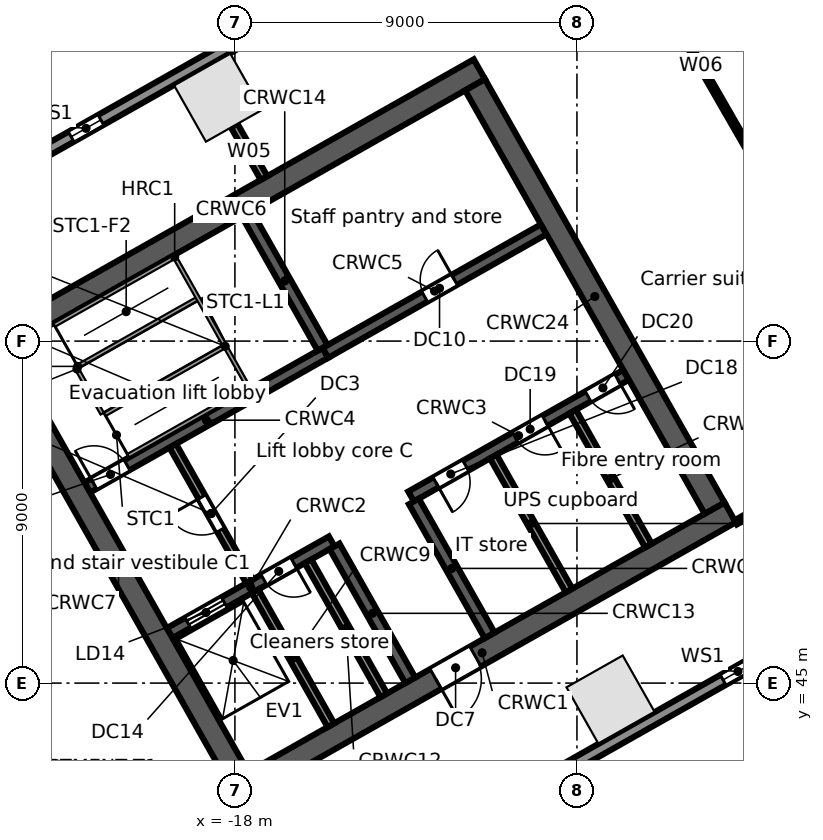
"""IFC4 building model, lengths in metres.
Left out: names, types, materials, properties, quantities, classifications, styles, units other than length and angle.
Written with IfcOpenShell. Run it as: python <this file> out.ifc"""

import sys

from ifc_helpers import new_model, si_unit, direction, frame, frame_2d, origin, origin_2d, place, context, subcontext, project, spatial, rectangle, extrude, element, fill, save


model = new_model("IFC4")
c1 = context("Model", 3, precision=1e-05, world=origin(), true_north=direction((0.0, 1.0)))
c2 = subcontext(c1, "Body", "Model", "MODEL_VIEW")
j1 = project(units=[si_unit("LENGTHUNIT", "METRE"), si_unit("PLANEANGLEUNIT", "RADIAN")], contexts=[c1])
p1 = place(None, origin())
s1 = spatial("IfcSite", under=j1, at=p1, CompositionType="ELEMENT")
p2 = place(p1, origin())
s2 = spatial("IfcBuilding", under=s1, at=p2, CompositionType="ELEMENT")
p3 = place(p2, frame((0.0, 0.0, 86.5)))
s3 = spatial("IfcBuildingStorey", under=s2, at=p3, CompositionType="ELEMENT", Elevation=86.5)
for number, where, z_axis, x_axis in (
    (1, (-18.441, 60.406, 0.0), (0.0, 0.0, 1.0), (-0.87, -0.492, 0.0)),
    (2, (-8.117, 44.568, 0.0), (0.0, 0.0, 1.0), (0.87, 0.492, 0.0)),
):
    element("IfcColumn", number, at=place(p3, frame(where, z_axis=z_axis, x_axis=x_axis)), inside=s3, PredefinedType="COLUMN", context=c2, shape_type="SweptSolid", body=[
        extrude(rectangle(XDim=1.7, YDim=1.7, at=origin_2d()), origin(), (0.0, 0.0, 1.0), 5.0),
    ])
p4 = place(p3, frame((-58.745, 38.764, 0.0), z_axis=(0.0, 0.0, 1.0), x_axis=(0.870355811726, 0.492423355453, 0.0)))
e3 = element("IfcWall", 3, at=p4, inside=s3, PredefinedType="STANDARD", context=c2, shape_type="SweptSolid", body=[
    extrude(rectangle(XDim=64.025, YDim=0.3, at=frame_2d((32.013, 0.0))), origin(), (0.0, 0.0, 1.0), 4.65),
])
p5 = place(p4, frame((60.122, 0.0, 0.6)))
e4 = element("IfcOpeningElement", 4, at=p5, cuts=e3, PredefinedType="OPENING", context=c2, shape_type="SweptSolid", body=[
    extrude(rectangle(XDim=0.9, YDim=3.2, at=frame_2d((0.45, 1.6))), frame((0.0, 0.16, 0.0), z_axis=(0.0, -1.0, 0.0), x_axis=(1.0, 0.0, 0.0)), (0.0, 0.0, 1.0), 0.32),
])
p6 = place(p4, frame((50.992, 0.0, 0.6)))
e5 = element("IfcOpeningElement", 5, at=p6, cuts=e3, PredefinedType="OPENING", context=c2, shape_type="SweptSolid", body=[
    extrude(rectangle(XDim=0.9, YDim=3.2, at=frame_2d((0.45, 1.6))), frame((0.0, 0.16, 0.0), z_axis=(0.0, -1.0, 0.0), x_axis=(1.0, 0.0, 0.0)), (0.0, 0.0, 1.0), 0.32),
])
p7 = place(p4, frame((41.862, 0.0, 0.6)))
e6 = element("IfcOpeningElement", 6, at=p7, cuts=e3, PredefinedType="OPENING", context=c2, shape_type="SweptSolid", body=[
    extrude(rectangle(XDim=0.9, YDim=3.2, at=frame_2d((0.45, 1.6))), frame((0.0, 0.16, 0.0), z_axis=(0.0, -1.0, 0.0), x_axis=(1.0, 0.0, 0.0)), (0.0, 0.0, 1.0), 0.32),
])
p8 = place(p4, frame((32.732, 0.0, 0.6)))
e7 = element("IfcOpeningElement", 7, at=p8, cuts=e3, PredefinedType="OPENING", context=c2, shape_type="SweptSolid", body=[
    extrude(rectangle(XDim=0.9, YDim=3.2, at=frame_2d((0.45, 1.6))), frame((0.0, 0.16, 0.0), z_axis=(0.0, -1.0, 0.0), x_axis=(1.0, 0.0, 0.0)), (0.0, 0.0, 1.0), 0.32),
])
p9 = place(p4, frame((23.602, 0.0, 0.6)))
e8 = element("IfcOpeningElement", 8, at=p9, cuts=e3, PredefinedType="OPENING", context=c2, shape_type="SweptSolid", body=[
    extrude(rectangle(XDim=0.9, YDim=3.2, at=frame_2d((0.45, 1.6))), frame((0.0, 0.16, 0.0), z_axis=(0.0, -1.0, 0.0), x_axis=(1.0, 0.0, 0.0)), (0.0, 0.0, 1.0), 0.32),
])
p10 = place(p4, frame((14.472, 0.0, 0.6)))
e9 = element("IfcOpeningElement", 9, at=p10, cuts=e3, PredefinedType="OPENING", context=c2, shape_type="SweptSolid", body=[
    extrude(rectangle(XDim=0.9, YDim=3.2, at=frame_2d((0.45, 1.6))), frame((0.0, 0.16, 0.0), z_axis=(0.0, -1.0, 0.0), x_axis=(1.0, 0.0, 0.0)), (0.0, 0.0, 1.0), 0.32),
])
p11 = place(p4, frame((5.342, 0.0, 0.6)))
e10 = element("IfcOpeningElement", 10, at=p11, cuts=e3, PredefinedType="OPENING", context=c2, shape_type="SweptSolid", body=[
    extrude(rectangle(XDim=0.9, YDim=3.2, at=frame_2d((0.45, 1.6))), frame((0.0, 0.16, 0.0), z_axis=(0.0, -1.0, 0.0), x_axis=(1.0, 0.0, 0.0)), (0.0, 0.0, 1.0), 0.32),
])
p12 = place(p3, frame((-0.055, 47.969, 0.0), z_axis=(0.0, 0.0, 1.0), x_axis=(-0.870355730478, -0.492423499058, 0.0)))
e11 = element("IfcWall", 11, at=p12, inside=s3, PredefinedType="STANDARD", context=c2, shape_type="SweptSolid", body=[
    extrude(rectangle(XDim=43.75, YDim=0.3, at=frame_2d((21.875, 0.0))), origin(), (0.0, 0.0, 1.0), 4.65),
])
p13 = place(p12, frame((39.977, 0.0, 0.6)))
e12 = element("IfcOpeningElement", 12, at=p13, cuts=e11, PredefinedType="OPENING", context=c2, shape_type="SweptSolid", body=[
    extrude(rectangle(XDim=0.9, YDim=3.2, at=frame_2d((0.45, 1.6))), frame((0.0, 0.16, 0.0), z_axis=(0.0, -1.0, 0.0), x_axis=(1.0, 0.0, 0.0)), (0.0, 0.0, 1.0), 0.32),
])
p14 = place(p12, frame((31.222, 0.0, 0.6)))
e13 = element("IfcOpeningElement", 13, at=p14, cuts=e11, PredefinedType="OPENING", context=c2, shape_type="SweptSolid", body=[
    extrude(rectangle(XDim=0.9, YDim=3.2, at=frame_2d((0.45, 1.6))), frame((0.0, 0.16, 0.0), z_axis=(0.0, -1.0, 0.0), x_axis=(1.0, 0.0, 0.0)), (0.0, 0.0, 1.0), 0.32),
])
p15 = place(p12, frame((22.468, 0.0, 0.6)))
e14 = element("IfcOpeningElement", 14, at=p15, cuts=e11, PredefinedType="OPENING", context=c2, shape_type="SweptSolid", body=[
    extrude(rectangle(XDim=0.9, YDim=3.2, at=frame_2d((0.45, 1.6))), frame((0.0, 0.16, 0.0), z_axis=(0.0, -1.0, 0.0), x_axis=(1.0, 0.0, 0.0)), (0.0, 0.0, 1.0), 0.32),
])
p16 = place(p12, frame((13.713, 0.0, 0.6)))
e15 = element("IfcOpeningElement", 15, at=p16, cuts=e11, PredefinedType="OPENING", context=c2, shape_type="SweptSolid", body=[
    extrude(rectangle(XDim=0.9, YDim=3.2, at=frame_2d((0.45, 1.6))), frame((0.0, 0.16, 0.0), z_axis=(0.0, -1.0, 0.0), x_axis=(1.0, 0.0, 0.0)), (0.0, 0.0, 1.0), 0.32),
])
p17 = place(p12, frame((4.959, 0.0, 0.6)))
e16 = element("IfcOpeningElement", 16, at=p17, cuts=e11, PredefinedType="OPENING", context=c2, shape_type="SweptSolid", body=[
    extrude(rectangle(XDim=0.9, YDim=3.2, at=frame_2d((0.45, 1.6))), frame((0.0, 0.16, 0.0), z_axis=(0.0, -1.0, 0.0), x_axis=(1.0, 0.0, 0.0)), (0.0, 0.0, 1.0), 0.32),
])
p18 = place(p3, frame((-18.024, 42.104, 0.0), z_axis=(0.0, 0.0, 1.0), x_axis=(0.870360574057, 0.492414937962, 0.0)))
e17 = element("IfcWall", 17, at=p18, inside=s3, PredefinedType="SOLIDWALL", context=c2, shape_type="SweptSolid", body=[
    extrude(rectangle(XDim=15.0, YDim=0.6, at=frame_2d((7.5, 0.0))), origin(), (0.0, 0.0, 1.0), 4.65),
])
p19 = place(p18, frame((6.1, 0.0, 0.0)))
e18 = element("IfcOpeningElement", 18, at=p19, cuts=e17, PredefinedType="OPENING", context=c2, shape_type="SweptSolid", body=[
    extrude(rectangle(XDim=1.2, YDim=2.1, at=frame_2d((0.6, 1.05))), frame((0.0, 0.31, 0.0), z_axis=(0.0, -1.0, 0.0), x_axis=(1.0, 0.0, 0.0)), (0.0, 0.0, 1.0), 0.62),
])
p20 = place(p3, frame((-19.718, 46.316, 0.0), z_axis=(0.0, 0.0, 1.0), x_axis=(0.870353963862, 0.492426621528, 0.0)))
e19 = element("IfcWall", 19, at=p20, inside=s3, PredefinedType="SOLIDWALL", context=c2, shape_type="SweptSolid", body=[
    extrude(rectangle(XDim=4.9, YDim=0.3, at=frame_2d((2.45, 0.0))), origin(), (0.0, 0.0, 1.0), 4.65),
])
p21 = place(p20, frame((0.55, 0.0, 0.0)))
e20 = element("IfcOpeningElement", 20, at=p21, cuts=e19, PredefinedType="OPENING", context=c2, shape_type="SweptSolid", body=[
    extrude(rectangle(XDim=1.1, YDim=2.1, at=frame_2d((0.55, 1.05))), frame((0.0, 0.16, 0.0), z_axis=(0.0, -1.0, 0.0), x_axis=(1.0, 0.0, 0.0)), (0.0, 0.0, 1.0), 0.32),
])
p22 = place(p20, frame((2.85, 0.0, 0.0)))
e21 = element("IfcOpeningElement", 21, at=p22, cuts=e19, PredefinedType="OPENING", context=c2, shape_type="SweptSolid", body=[
    extrude(rectangle(XDim=0.9, YDim=2.1, at=frame_2d((0.45, 1.05))), frame((0.0, 0.16, 0.0), z_axis=(0.0, -1.0, 0.0), x_axis=(1.0, 0.0, 0.0)), (0.0, 0.0, 1.0), 0.32),
])
p23 = place(p3, frame((-13.365, 49.911, 0.0), z_axis=(0.0, 0.0, 1.0), x_axis=(0.870340995471, 0.49244954219, 0.0)))
e22 = element("IfcWall", 22, at=p23, inside=s3, PredefinedType="SOLIDWALL", context=c2, shape_type="SweptSolid", body=[
    extrude(rectangle(XDim=6.5, YDim=0.3, at=frame_2d((3.25, 0.0))), origin(), (0.0, 0.0, 1.0), 4.65),
])
p24 = place(p23, frame((0.75, 0.0, 0.0)))
e23 = element("IfcOpeningElement", 23, at=p24, cuts=e22, PredefinedType="OPENING", context=c2, shape_type="SweptSolid", body=[
    extrude(rectangle(XDim=0.9, YDim=2.1, at=frame_2d((0.45, 1.05))), frame((0.0, 0.16, 0.0), z_axis=(0.0, -1.0, 0.0), x_axis=(1.0, 0.0, 0.0)), (0.0, 0.0, 1.0), 0.32),
])
p25 = place(p23, frame((3.15, 0.0, 0.0)))
e24 = element("IfcOpeningElement", 24, at=p25, cuts=e22, PredefinedType="OPENING", context=c2, shape_type="SweptSolid", body=[
    extrude(rectangle(XDim=0.9, YDim=2.1, at=frame_2d((0.45, 1.05))), frame((0.0, 0.16, 0.0), z_axis=(0.0, -1.0, 0.0), x_axis=(1.0, 0.0, 0.0)), (0.0, 0.0, 1.0), 0.32),
])
p26 = place(p23, frame((5.35, 0.0, 0.0)))
e25 = element("IfcOpeningElement", 25, at=p26, cuts=e22, PredefinedType="OPENING", context=c2, shape_type="SweptSolid", body=[
    extrude(rectangle(XDim=0.9, YDim=2.1, at=frame_2d((0.45, 1.05))), frame((0.0, 0.16, 0.0), z_axis=(0.0, -1.0, 0.0), x_axis=(1.0, 0.0, 0.0)), (0.0, 0.0, 1.0), 0.32),
])
p27 = place(p3, frame((-21.885, 50.146, 0.0), z_axis=(0.0, 0.0, 1.0), x_axis=(0.870359411463, 0.492416992881, 0.0)))
e26 = element("IfcWall", 26, at=p27, inside=s3, PredefinedType="SOLIDWALL", context=c2, shape_type="SweptSolid", body=[
    extrude(rectangle(XDim=7.2, YDim=0.3, at=frame_2d((3.6, 0.0))), origin(), (0.0, 0.0, 1.0), 4.65),
])
p28 = place(p27, frame((0.2, 0.0, 0.0)))
e27 = element("IfcOpeningElement", 27, at=p28, cuts=e26, PredefinedType="OPENING", context=c2, shape_type="SweptSolid", body=[
    extrude(rectangle(XDim=1.0, YDim=2.1, at=frame_2d((0.5, 1.05))), frame((0.0, 0.16, 0.0), z_axis=(0.0, -1.0, 0.0), x_axis=(1.0, 0.0, 0.0)), (0.0, 0.0, 1.0), 0.32),
])
p29 = place(p3, frame((-15.618, 53.691, 0.0), z_axis=(0.0, 0.0, 1.0), x_axis=(0.870356769198, 0.492421663121, 0.0)))
e28 = element("IfcWall", 28, at=p29, inside=s3, PredefinedType="SOLIDWALL", context=c2, shape_type="SweptSolid", body=[
    extrude(rectangle(XDim=6.6, YDim=0.3, at=frame_2d((3.3, 0.0))), origin(), (0.0, 0.0, 1.0), 4.65),
])
p30 = place(p29, frame((3.0, 0.0, 0.0)))
e29 = element("IfcOpeningElement", 29, at=p30, cuts=e28, PredefinedType="OPENING", context=c2, shape_type="SweptSolid", body=[
    extrude(rectangle(XDim=0.9, YDim=2.1, at=frame_2d((0.45, 1.05))), frame((0.0, 0.16, 0.0), z_axis=(0.0, -1.0, 0.0), x_axis=(1.0, 0.0, 0.0)), (0.0, 0.0, 1.0), 0.32),
])
p31 = place(p3, frame((-24.623, 53.767, 0.0), z_axis=(0.0, 0.0, 1.0), x_axis=(0.870356627484, 0.492421913601, 0.0)))
e30 = element("IfcWall", 30, at=p31, inside=s3, PredefinedType="SOLIDWALL", context=c2, shape_type="SweptSolid", body=[
    extrude(rectangle(XDim=15.0, YDim=0.6, at=frame_2d((7.5, 0.0))), origin(), (0.0, 0.0, 1.0), 4.65),
])
p32 = place(p3, frame((-24.214, 53.654, 0.0), z_axis=(0.0, 0.0, 1.0), x_axis=(0.492441221355, -0.870345703448, 0.0)))
e31 = element("IfcWall", 31, at=p32, inside=s3, PredefinedType="SOLIDWALL", context=c2, shape_type="SweptSolid", body=[
    extrude(rectangle(XDim=12.8, YDim=0.6, at=frame_2d((6.4, 0.0))), origin(), (0.0, 0.0, 1.0), 4.65),
])
p33 = place(p3, frame((-17.469, 47.417, 0.0), z_axis=(0.0, 0.0, 1.0), x_axis=(0.492440575896, -0.870346068648, 0.0)))
e32 = element("IfcWall", 32, at=p33, inside=s3, PredefinedType="SOLIDWALL", context=c2, shape_type="SweptSolid", body=[
    extrude(rectangle(XDim=4.05, YDim=0.2, at=frame_2d((2.025, 0.0))), origin(), (0.0, 0.0, 1.0), 4.65),
])
p34 = place(p3, frame((-19.635, 51.246, 0.0), z_axis=(0.0, 0.0, 1.0), x_axis=(0.492408451753, -0.87036424366, 0.0)))
e33 = element("IfcWall", 33, at=p34, inside=s3, PredefinedType="PARTITIONING", context=c2, shape_type="SweptSolid", body=[
    extrude(rectangle(XDim=4.1, YDim=0.2, at=frame_2d((2.05, 0.0))), origin(), (0.0, 0.0, 1.0), 4.65),
])
p35 = place(p34, frame((1.55, 0.0, 0.0)))
e34 = element("IfcOpeningElement", 34, at=p35, cuts=e33, PredefinedType="OPENING", context=c2, shape_type="SweptSolid", body=[
    extrude(rectangle(XDim=1.0, YDim=2.1, at=frame_2d((0.5, 1.05))), frame((0.0, 0.11, 0.0), z_axis=(0.0, -1.0, 0.0), x_axis=(1.0, 0.0, 0.0)), (0.0, 0.0, 1.0), 0.22),
])
p36 = place(p3, frame((-16.076, 48.205, 0.0), z_axis=(0.0, 0.0, 1.0), x_axis=(0.492394910396, -0.870371904542, 0.0)))
e35 = element("IfcWall", 35, at=p36, inside=s3, PredefinedType="SOLIDWALL", context=c2, shape_type="SweptSolid", body=[
    extrude(rectangle(XDim=4.05, YDim=0.2, at=frame_2d((2.025, 0.0))), origin(), (0.0, 0.0, 1.0), 4.65),
])
p37 = place(p3, frame((-15.379, 48.599, 0.0), z_axis=(0.0, 0.0, 1.0), x_axis=(0.492394910396, -0.870371904542, 0.0)))
e36 = element("IfcWall", 36, at=p37, inside=s3, PredefinedType="SOLIDWALL", context=c2, shape_type="SweptSolid", body=[
    extrude(rectangle(XDim=4.05, YDim=0.3, at=frame_2d((2.025, 0.0))), origin(), (0.0, 0.0, 1.0), 4.65),
])
p38 = place(p3, frame((-17.686, 57.347, 0.0), z_axis=(0.0, 0.0, 1.0), x_axis=(0.492420746998, -0.870357287513, 0.0)))
e37 = element("IfcWall", 37, at=p38, inside=s3, PredefinedType="SOLIDWALL", context=c2, shape_type="SweptSolid", body=[
    extrude(rectangle(XDim=4.05, YDim=0.3, at=frame_2d((2.025, 0.0))), origin(), (0.0, 0.0, 1.0), 4.65),
])
p39 = place(p3, frame((-13.291, 49.781, 0.0), z_axis=(0.0, 0.0, 1.0), x_axis=(0.492394910396, -0.870371904542, 0.0)))
e38 = element("IfcWall", 38, at=p39, inside=s3, PredefinedType="SOLIDWALL", context=c2, shape_type="SweptSolid", body=[
    extrude(rectangle(XDim=4.05, YDim=0.3, at=frame_2d((2.025, 0.0))), origin(), (0.0, 0.0, 1.0), 4.65),
])
p40 = place(p3, frame((-11.202, 50.962, 0.0), z_axis=(0.0, 0.0, 1.0), x_axis=(0.49241474071, -0.870360685654, 0.0)))
e39 = element("IfcWall", 39, at=p40, inside=s3, PredefinedType="PARTITIONING", context=c2, shape_type="SweptSolid", body=[
    extrude(rectangle(XDim=4.05, YDim=0.2, at=frame_2d((2.025, 0.0))), origin(), (0.0, 0.0, 1.0), 4.65),
])
p41 = place(p3, frame((-9.113, 52.144, 0.0), z_axis=(0.0, 0.0, 1.0), x_axis=(0.492394910396, -0.870371904542, 0.0)))
e40 = element("IfcWall", 40, at=p41, inside=s3, PredefinedType="PARTITIONING", context=c2, shape_type="SweptSolid", body=[
    extrude(rectangle(XDim=4.05, YDim=0.2, at=frame_2d((2.025, 0.0))), origin(), (0.0, 0.0, 1.0), 4.65),
])
p42 = place(p3, frame((-11.681, 60.744, 0.0), z_axis=(0.0, 0.0, 1.0), x_axis=(0.492426772896, -0.870353878221, 0.0)))
e41 = element("IfcWall", 41, at=p42, inside=s3, PredefinedType="SOLIDWALL", context=c2, shape_type="SweptSolid", body=[
    extrude(rectangle(XDim=12.8, YDim=0.6, at=frame_2d((6.4, 0.0))), origin(), (0.0, 0.0, 1.0), 4.65),
])
p43 = place(p3, frame((-18.018, 59.669, 0.0), z_axis=(0.0, 0.0, 1.0), x_axis=(0.494877399769, -0.868962806568, 0.0)))
e42 = element("IfcWall", 42, at=p43, inside=s3, PredefinedType="PARTITIONING", context=c2, shape_type="SweptSolid", body=[
    extrude(rectangle(XDim=1.584, YDim=0.2, at=frame_2d((0.792, 0.0))), origin(), (0.0, 0.0, 1.0), 3.83),
])
p44 = place(p3, frame((-8.931, 66.775, 0.0), z_axis=(0.0, 0.0, 1.0), x_axis=(0.498955759248, -0.866627457627, 0.0)))
e43 = element("IfcWall", 43, at=p44, inside=s3, PredefinedType="PARTITIONING", context=c2, shape_type="SweptSolid", body=[
    extrude(rectangle(XDim=12.794, YDim=0.125, at=frame_2d((6.397, 0.0))), origin(), (0.0, 0.0, 1.0), 3.822),
])
p45 = place(p3, frame((-4.821, 49.23, 0.0), z_axis=(0.0, 0.0, 1.0), x_axis=(0.870371217631, 0.492396124598, 0.0)))
e44 = element("IfcWall", 44, at=p45, inside=s3, PredefinedType="PARTITIONING", context=c2, shape_type="SweptSolid", body=[
    extrude(rectangle(XDim=2.659, YDim=0.125, at=frame_2d((1.329, 0.0))), origin(), (0.0, 0.0, 1.0), 4.65),
])
p46 = place(p7, origin())
e45 = element("IfcWindow", 45, at=p46, inside=s3, PartitioningType="SINGLE_PANEL", PredefinedType="WINDOW", context=c2, shape_type="SweptSolid", body=[
    extrude(rectangle(XDim=0.9, YDim=3.2, at=frame_2d((0.45, 1.6))), frame((0.0, 0.03, 0.0), z_axis=(0.0, -1.0, 0.0), x_axis=(1.0, 0.0, 0.0)), (0.0, 0.0, 1.0), 0.06),
])
fill(e6, e45)
p47 = place(p17, origin())
e46 = element("IfcWindow", 46, at=p47, inside=s3, PartitioningType="SINGLE_PANEL", PredefinedType="WINDOW", context=c2, shape_type="SweptSolid", body=[
    extrude(rectangle(XDim=0.9, YDim=3.2, at=frame_2d((0.45, 1.6))), frame((0.0, 0.03, 0.0), z_axis=(0.0, -1.0, 0.0), x_axis=(1.0, 0.0, 0.0)), (0.0, 0.0, 1.0), 0.06),
])
fill(e16, e46)
p48 = place(p21, origin())
e47 = element("IfcDoor", 47, at=p48, inside=s3, OperationType="DOUBLE_DOOR_SLIDING", PredefinedType="DOOR", context=c2, shape_type="SweptSolid", body=[
    extrude(rectangle(XDim=1.1, YDim=2.1, at=frame_2d((0.55, 1.05))), frame((0.0, 0.025, 0.0), z_axis=(0.0, -1.0, 0.0), x_axis=(1.0, 0.0, 0.0)), (0.0, 0.0, 1.0), 0.05),
])
fill(e20, e47)
p49 = place(p28, origin())
e48 = element("IfcDoor", 48, at=p49, inside=s3, OperationType="SINGLE_SWING_LEFT", PredefinedType="DOOR", context=c2, shape_type="SweptSolid", body=[
    extrude(rectangle(XDim=1.0, YDim=2.1, at=frame_2d((0.5, 1.05))), frame((0.0, 0.025, 0.0), z_axis=(0.0, -1.0, 0.0), x_axis=(1.0, 0.0, 0.0)), (0.0, 0.0, 1.0), 0.05),
])
fill(e27, e48)
p50 = place(p35, frame((1.0, 0.0, 0.0), z_axis=(0.0, 0.0, 1.0), x_axis=(-1.0, 0.0, 0.0)))
e49 = element("IfcDoor", 49, at=p50, inside=s3, OperationType="SINGLE_SWING_RIGHT", PredefinedType="DOOR", context=c2, shape_type="SweptSolid", body=[
    extrude(rectangle(XDim=1.0, YDim=2.1, at=frame_2d((0.5, 1.05))), frame((0.0, 0.025, 0.0), z_axis=(0.0, -1.0, 0.0), x_axis=(1.0, 0.0, 0.0)), (0.0, 0.0, 1.0), 0.05),
])
fill(e34, e49)
p51 = place(p19, frame((1.2, 0.0, 0.0), z_axis=(0.0, 0.0, 1.0), x_axis=(-1.0, 0.0, 0.0)))
e50 = element("IfcDoor", 50, at=p51, inside=s3, OperationType="SINGLE_SWING_RIGHT", PredefinedType="DOOR", context=c2, shape_type="SweptSolid", body=[
    extrude(rectangle(XDim=1.2, YDim=2.1, at=frame_2d((0.6, 1.05))), frame((0.0, 0.025, 0.0), z_axis=(0.0, -1.0, 0.0), x_axis=(1.0, 0.0, 0.0)), (0.0, 0.0, 1.0), 0.05),
])
fill(e18, e50)
p52 = place(p30, origin())
e51 = element("IfcDoor", 51, at=p52, inside=s3, OperationType="SINGLE_SWING_RIGHT", PredefinedType="DOOR", context=c2, shape_type="SweptSolid", body=[
    extrude(rectangle(XDim=0.9, YDim=2.1, at=frame_2d((0.45, 1.05))), frame((0.0, 0.025, 0.0), z_axis=(0.0, -1.0, 0.0), x_axis=(1.0, 0.0, 0.0)), (0.0, 0.0, 1.0), 0.05),
])
fill(e29, e51)
p53 = place(p22, frame((0.9, 0.0, 0.0), z_axis=(0.0, 0.0, 1.0), x_axis=(-1.0, 0.0, 0.0)))
e52 = element("IfcDoor", 52, at=p53, inside=s3, OperationType="SINGLE_SWING_LEFT", PredefinedType="DOOR", context=c2, shape_type="SweptSolid", body=[
    extrude(rectangle(XDim=0.9, YDim=2.1, at=frame_2d((0.45, 1.05))), frame((0.0, 0.025, 0.0), z_axis=(0.0, -1.0, 0.0), x_axis=(1.0, 0.0, 0.0)), (0.0, 0.0, 1.0), 0.05),
])
fill(e21, e52)
p54 = place(p24, frame((0.9, 0.0, 0.0), z_axis=(0.0, 0.0, 1.0), x_axis=(-1.0, 0.0, 0.0)))
e53 = element("IfcDoor", 53, at=p54, inside=s3, OperationType="SINGLE_SWING_RIGHT", PredefinedType="DOOR", context=c2, shape_type="SweptSolid", body=[
    extrude(rectangle(XDim=0.9, YDim=2.1, at=frame_2d((0.45, 1.05))), frame((0.0, 0.025, 0.0), z_axis=(0.0, -1.0, 0.0), x_axis=(1.0, 0.0, 0.0)), (0.0, 0.0, 1.0), 0.05),
])
fill(e23, e53)
p55 = place(p25, frame((0.9, 0.0, 0.0), z_axis=(0.0, 0.0, 1.0), x_axis=(-1.0, 0.0, 0.0)))
e54 = element("IfcDoor", 54, at=p55, inside=s3, OperationType="SINGLE_SWING_LEFT", PredefinedType="DOOR", context=c2, shape_type="SweptSolid", body=[
    extrude(rectangle(XDim=0.9, YDim=2.1, at=frame_2d((0.45, 1.05))), frame((0.0, 0.025, 0.0), z_axis=(0.0, -1.0, 0.0), x_axis=(1.0, 0.0, 0.0)), (0.0, 0.0, 1.0), 0.05),
])
fill(e24, e54)
p56 = place(p26, frame((0.9, 0.0, 0.0), z_axis=(0.0, 0.0, 1.0), x_axis=(-1.0, 0.0, 0.0)))
e55 = element("IfcDoor", 55, at=p56, inside=s3, OperationType="SINGLE_SWING_LEFT", PredefinedType="DOOR", context=c2, shape_type="SweptSolid", body=[
    extrude(rectangle(XDim=0.9, YDim=2.1, at=frame_2d((0.45, 1.05))), frame((0.0, 0.025, 0.0), z_axis=(0.0, -1.0, 0.0), x_axis=(1.0, 0.0, 0.0)), (0.0, 0.0, 1.0), 0.05),
])
fill(e25, e55)
save(model, sys.argv[1])
